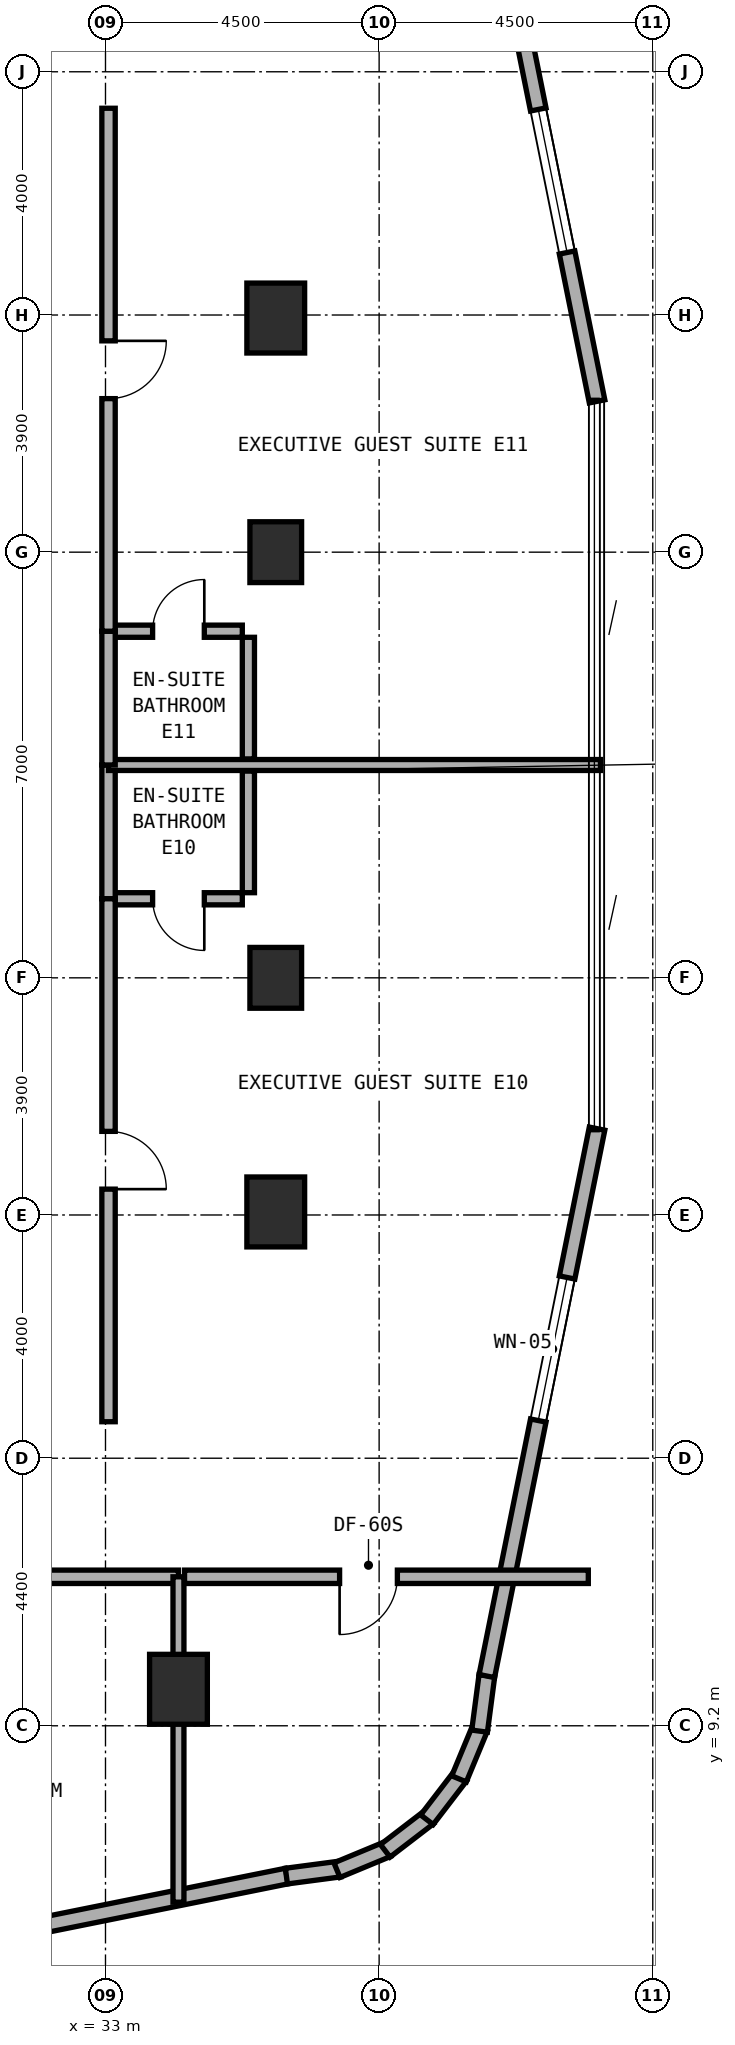
"""IFC4 building model, lengths in metres.
Left out: names, types, materials, properties, quantities, classifications, styles, units other than length and angle.
Written with IfcOpenShell. Run it as: python <this file> out.ifc"""

import sys

from ifc_helpers import new_model, si_unit, direction, frame, frame_2d, origin, origin_2d, place, context, subcontext, project, spatial, rectangle, extrude, element, fill, save


model = new_model("IFC4")
c1 = context("Model", 3, precision=1e-05, world=origin(), true_north=direction((0.0, 1.0)))
c2 = subcontext(c1, "Body", "Model", "MODEL_VIEW")
j1 = project(units=[si_unit("LENGTHUNIT", "METRE"), si_unit("PLANEANGLEUNIT", "RADIAN")], contexts=[c1])
p1 = place(None, origin())
s1 = spatial("IfcSite", under=j1, at=p1, CompositionType="ELEMENT")
p2 = place(p1, origin())
s2 = spatial("IfcBuilding", under=s1, at=p2, CompositionType="ELEMENT")
p3 = place(p2, frame((0.0, 0.0, 127.5)))
s3 = spatial("IfcBuildingStorey", under=s2, at=p3, CompositionType="ELEMENT", Elevation=127.5)
p4 = place(p3, frame((34.2, 9.8, 0.0), z_axis=(0.0, 0.0, 1.0), x_axis=(1.0, 0.0, 0.0)))
e1 = element("IfcColumn", 1, at=p4, inside=s3, PredefinedType="COLUMN", context=c2, shape_type="SweptSolid", body=[
    extrude(rectangle(XDim=0.95, YDim=1.15, at=origin_2d()), origin(), (0.0, 0.0, 1.0), 3.5),
])
for number, where, z_axis, x_axis in (
    (2, (35.8, 21.5, 0.0), (0.0, 0.0, 1.0), (1.0, 0.0, 0.0)),
    (3, (35.8, 28.5, 0.0), (0.0, 0.0, 1.0), (1.0, 0.0, 0.0)),
):
    element("IfcColumn", number, at=place(p3, frame(where, z_axis=z_axis, x_axis=x_axis)), inside=s3, PredefinedType="COLUMN", context=c2, shape_type="SweptSolid", body=[
        extrude(rectangle(XDim=0.85, YDim=1.0, at=origin_2d()), origin(), (0.0, 0.0, 1.0), 3.5),
    ])
for number, where, z_axis, x_axis in (
    (4, (35.8, 17.65, 0.0), (0.0, 0.0, 1.0), (1.0, 0.0, 0.0)),
    (5, (35.8, 32.35, 0.0), (0.0, 0.0, 1.0), (1.0, 0.0, 0.0)),
):
    element("IfcColumn", number, at=place(p3, frame(where, z_axis=z_axis, x_axis=x_axis)), inside=s3, PredefinedType="COLUMN", context=c2, shape_type="SweptSolid", body=[
        extrude(rectangle(XDim=0.95, YDim=1.15, at=origin_2d()), origin(), (0.0, 0.0, 1.0), 3.5),
    ])
p5 = place(p3, frame((26.98, 4.916, 0.0), z_axis=(0.0, 0.0, 1.0), x_axis=(0.980315963543, 0.197435082048, 0.0)))
e6 = element("IfcWall", 6, at=p5, inside=s3, PredefinedType="STANDARD", context=c2, shape_type="SweptSolid", body=[
    extrude(rectangle(XDim=9.183, YDim=0.26, at=frame_2d((4.591, 0.0))), origin(), (0.0, 0.0, 1.0), 3.22),
])
p6 = place(p5, frame((2.445, 0.0, 0.8)))
e7 = element("IfcOpeningElement", 7, at=p6, cuts=e6, PredefinedType="OPENING", context=c2, shape_type="SweptSolid", body=[
    extrude(rectangle(XDim=2.4, YDim=1.6, at=frame_2d((1.2, 0.8))), frame((0.0, 0.14, 0.0), z_axis=(0.0, -1.0, 0.0), x_axis=(1.0, 0.0, 0.0)), (0.0, 0.0, 1.0), 0.28),
])
p7 = place(p3, frame((35.975, 6.728, 0.0), z_axis=(0.0, 0.0, 1.0), x_axis=(0.991388484223, 0.130953706898, 0.0)))
e8 = element("IfcWall", 8, at=p7, inside=s3, PredefinedType="STANDARD", context=c2, shape_type="SweptSolid", body=[
    extrude(rectangle(XDim=0.885, YDim=0.26, at=frame_2d((0.443, 0.0))), origin(), (0.0, 0.0, 1.0), 3.22),
])
p8 = place(p3, frame((36.807, 6.826, 0.0), z_axis=(0.0, 0.0, 1.0), x_axis=(0.923627776508, 0.383290660547, 0.0)))
e9 = element("IfcWall", 9, at=p8, inside=s3, PredefinedType="STANDARD", context=c2, shape_type="SweptSolid", body=[
    extrude(rectangle(XDim=0.903, YDim=0.26, at=frame_2d((0.452, 0.0))), origin(), (0.0, 0.0, 1.0), 3.22),
])
p9 = place(p3, frame((37.601, 7.144, 0.0), z_axis=(0.0, 0.0, 1.0), x_axis=(0.793458244748, 0.608624690463, 0.0)))
e10 = element("IfcWall", 10, at=p9, inside=s3, PredefinedType="STANDARD", context=c2, shape_type="SweptSolid", body=[
    extrude(rectangle(XDim=0.902, YDim=0.26, at=frame_2d((0.451, 0.0))), origin(), (0.0, 0.0, 1.0), 3.22),
])
p10 = place(p3, frame((38.286, 7.655, 0.0), z_axis=(0.0, 0.0, 1.0), x_axis=(0.608494022858, 0.793558456666, 0.0)))
e11 = element("IfcWall", 11, at=p10, inside=s3, PredefinedType="STANDARD", context=c2, shape_type="SweptSolid", body=[
    extrude(rectangle(XDim=0.902, YDim=0.26, at=frame_2d((0.451, 0.0))), origin(), (0.0, 0.0, 1.0), 3.22),
])
p11 = place(p3, frame((38.814, 8.327, 0.0), z_axis=(0.0, 0.0, 1.0), x_axis=(0.383155708213, 0.923683767999, 0.0)))
e12 = element("IfcWall", 12, at=p11, inside=s3, PredefinedType="STANDARD", context=c2, shape_type="SweptSolid", body=[
    extrude(rectangle(XDim=0.903, YDim=0.26, at=frame_2d((0.451, 0.0))), origin(), (0.0, 0.0, 1.0), 3.22),
])
p12 = place(p3, frame((39.152, 9.112, 0.0), z_axis=(0.0, 0.0, 1.0), x_axis=(0.130200706103, 0.991487658083, 0.0)))
e13 = element("IfcWall", 13, at=p12, inside=s3, PredefinedType="STANDARD", context=c2, shape_type="SweptSolid", body=[
    extrude(rectangle(XDim=0.921, YDim=0.26, at=frame_2d((0.46, 0.0))), origin(), (0.0, 0.0, 1.0), 3.22),
])
p13 = place(p3, frame((39.271, 10.018, 0.0), z_axis=(0.0, 0.0, 1.0), x_axis=(0.197435082048, 0.980315963543, 0.0)))
e14 = element("IfcWall", 14, at=p13, inside=s3, PredefinedType="STANDARD", context=c2, shape_type="SweptSolid", body=[
    extrude(rectangle(XDim=9.183, YDim=0.26, at=frame_2d((4.591, 0.0))), origin(), (0.0, 0.0, 1.0), 3.22),
])
p14 = place(p13, frame((4.286, 0.0, 0.8)))
e15 = element("IfcOpeningElement", 15, at=p14, cuts=e14, PredefinedType="OPENING", context=c2, shape_type="SweptSolid", body=[
    extrude(rectangle(XDim=2.4, YDim=1.6, at=frame_2d((1.2, 0.8))), frame((0.0, 0.14, 0.0), z_axis=(0.0, -1.0, 0.0), x_axis=(1.0, 0.0, 0.0)), (0.0, 0.0, 1.0), 0.28),
])
p15 = place(p3, frame((41.084, 30.98, 0.0), z_axis=(0.0, 0.0, 1.0), x_axis=(-0.197435082048, 0.980315963543, 0.0)))
e16 = element("IfcWall", 16, at=p15, inside=s3, PredefinedType="STANDARD", context=c2, shape_type="SweptSolid", body=[
    extrude(rectangle(XDim=9.183, YDim=0.26, at=frame_2d((4.591, 0.0))), origin(), (0.0, 0.0, 1.0), 3.22),
])
p16 = place(p15, frame((2.497, 0.0, 0.8)))
e17 = element("IfcOpeningElement", 17, at=p16, cuts=e16, PredefinedType="OPENING", context=c2, shape_type="SweptSolid", body=[
    extrude(rectangle(XDim=2.4, YDim=1.6, at=frame_2d((1.2, 0.8))), frame((0.0, 0.14, 0.0), z_axis=(0.0, -1.0, 0.0), x_axis=(1.0, 0.0, 0.0)), (0.0, 0.0, 1.0), 0.28),
])
p17 = place(p3, frame((28.0, 11.65, 0.0), z_axis=(0.0, 0.0, 1.0), x_axis=(1.0, 0.0, 0.0)))
e18 = element("IfcWall", 18, at=p17, inside=s3, PredefinedType="SOLIDWALL", context=c2, shape_type="SweptSolid", body=[
    extrude(rectangle(XDim=6.2, YDim=0.22, at=frame_2d((3.1, 0.0))), origin(), (0.0, 0.0, 1.0), 2.695),
])
p18 = place(p17, frame((2.625, 0.0, 0.0)))
e19 = element("IfcOpeningElement", 19, at=p18, cuts=e18, PredefinedType="OPENING", context=c2, shape_type="SweptSolid", body=[
    extrude(rectangle(XDim=0.95, YDim=2.1, at=frame_2d((0.475, 1.05))), frame((0.0, 0.12, 0.0), z_axis=(0.0, -1.0, 0.0), x_axis=(1.0, 0.0, 0.0)), (0.0, 0.0, 1.0), 0.24),
])
p19 = place(p3, frame((34.2, 6.299, 0.0), z_axis=(0.0, 0.0, 1.0), x_axis=(0.0, 1.0, 0.0)))
e20 = element("IfcWall", 20, at=p19, inside=s3, PredefinedType="SOLIDWALL", context=c2, shape_type="SweptSolid", body=[
    extrude(rectangle(XDim=5.351, YDim=0.18, at=frame_2d((2.675, 0.0))), origin(), (0.0, 0.0, 1.0), 2.695),
])
p20 = place(p3, frame((34.3, 11.65, 0.0), z_axis=(0.0, 0.0, 1.0), x_axis=(1.0, 0.0, 0.0)))
e21 = element("IfcWall", 21, at=p20, inside=s3, PredefinedType="SOLIDWALL", context=c2, shape_type="SweptSolid", body=[
    extrude(rectangle(XDim=6.64, YDim=0.22, at=frame_2d((3.32, 0.0))), origin(), (0.0, 0.0, 1.0), 2.835),
])
p21 = place(p20, frame((2.55, 0.0, 0.0)))
e22 = element("IfcOpeningElement", 22, at=p21, cuts=e21, PredefinedType="OPENING", context=c2, shape_type="SweptSolid", body=[
    extrude(rectangle(XDim=0.95, YDim=2.1, at=frame_2d((0.475, 1.05))), frame((0.0, 0.12, 0.0), z_axis=(0.0, -1.0, 0.0), x_axis=(1.0, 0.0, 0.0)), (0.0, 0.0, 1.0), 0.24),
])
p22 = place(p3, frame((33.15, 22.8, 0.0), z_axis=(0.0, 0.0, 1.0), x_axis=(1.0, 0.0, 0.0)))
e23 = element("IfcWall", 23, at=p22, inside=s3, PredefinedType="PLUMBINGWALL", context=c2, shape_type="SweptSolid", body=[
    extrude(rectangle(XDim=2.1, YDim=0.2, at=frame_2d((1.05, 0.0))), origin(), (0.0, 0.0, 1.0), 3.22),
])
p23 = place(p22, frame((0.625, 0.0, 0.0)))
e24 = element("IfcOpeningElement", 24, at=p23, cuts=e23, PredefinedType="OPENING", context=c2, shape_type="SweptSolid", body=[
    extrude(rectangle(XDim=0.85, YDim=2.1, at=frame_2d((0.425, 1.05))), frame((0.0, 0.11, 0.0), z_axis=(0.0, -1.0, 0.0), x_axis=(1.0, 0.0, 0.0)), (0.0, 0.0, 1.0), 0.22),
])
p24 = place(p3, frame((35.35, 22.9, 0.0), z_axis=(0.0, 0.0, 1.0), x_axis=(0.0, 1.0, 0.0)))
e25 = element("IfcWall", 25, at=p24, inside=s3, PredefinedType="PLUMBINGWALL", context=c2, shape_type="SweptSolid", body=[
    extrude(rectangle(XDim=2.0, YDim=0.2, at=frame_2d((1.0, 0.0))), origin(), (0.0, 0.0, 1.0), 3.22),
])
p25 = place(p3, frame((33.05, 22.8, 0.0), z_axis=(0.0, 0.0, 1.0), x_axis=(0.0, 1.0, 0.0)))
e26 = element("IfcWall", 26, at=p25, inside=s3, PredefinedType="SOLIDWALL", context=c2, shape_type="SweptSolid", body=[
    extrude(rectangle(XDim=2.2, YDim=0.22, at=frame_2d((1.1, 0.0))), origin(), (0.0, 0.0, 1.0), 3.22),
])
p26 = place(p3, frame((33.05, 14.2, 0.0), z_axis=(0.0, 0.0, 1.0), x_axis=(0.0, 1.0, 0.0)))
e27 = element("IfcWall", 27, at=p26, inside=s3, PredefinedType="SOLIDWALL", context=c2, shape_type="SweptSolid", body=[
    extrude(rectangle(XDim=8.6, YDim=0.22, at=frame_2d((4.3, 0.0))), origin(), (0.0, 0.0, 1.0), 2.695),
])
p27 = place(p26, frame((3.825, 0.0, 0.0)))
e28 = element("IfcOpeningElement", 28, at=p27, cuts=e27, PredefinedType="OPENING", context=c2, shape_type="SweptSolid", body=[
    extrude(rectangle(XDim=0.95, YDim=2.1, at=frame_2d((0.475, 1.05))), frame((0.0, 0.12, 0.0), z_axis=(0.0, -1.0, 0.0), x_axis=(1.0, 0.0, 0.0)), (0.0, 0.0, 1.0), 0.24),
])
p28 = place(p3, frame((33.05, 25.0, 0.0), z_axis=(0.0, 0.0, 1.0), x_axis=(1.0, 0.0, 0.0)))
e29 = element("IfcWall", 29, at=p28, inside=s3, PredefinedType="SOLIDWALL", context=c2, shape_type="SweptSolid", body=[
    extrude(rectangle(XDim=8.09, YDim=0.18, at=frame_2d((4.045, 0.0))), origin(), (0.0, 0.0, 1.0), 2.835),
])
p29 = place(p3, frame((33.15, 27.2, 0.0), z_axis=(0.0, 0.0, 1.0), x_axis=(1.0, 0.0, 0.0)))
e30 = element("IfcWall", 30, at=p29, inside=s3, PredefinedType="PLUMBINGWALL", context=c2, shape_type="SweptSolid", body=[
    extrude(rectangle(XDim=2.1, YDim=0.2, at=frame_2d((1.05, 0.0))), origin(), (0.0, 0.0, 1.0), 3.22),
])
p30 = place(p29, frame((0.625, 0.0, 0.0)))
e31 = element("IfcOpeningElement", 31, at=p30, cuts=e30, PredefinedType="OPENING", context=c2, shape_type="SweptSolid", body=[
    extrude(rectangle(XDim=0.85, YDim=2.1, at=frame_2d((0.425, 1.05))), frame((0.0, 0.11, 0.0), z_axis=(0.0, -1.0, 0.0), x_axis=(1.0, 0.0, 0.0)), (0.0, 0.0, 1.0), 0.22),
])
p31 = place(p3, frame((35.35, 25.1, 0.0), z_axis=(0.0, 0.0, 1.0), x_axis=(0.0, 1.0, 0.0)))
e32 = element("IfcWall", 32, at=p31, inside=s3, PredefinedType="PLUMBINGWALL", context=c2, shape_type="SweptSolid", body=[
    extrude(rectangle(XDim=2.0, YDim=0.2, at=frame_2d((1.0, 0.0))), origin(), (0.0, 0.0, 1.0), 3.22),
])
p32 = place(p3, frame((33.05, 25.0, 0.0), z_axis=(0.0, 0.0, 1.0), x_axis=(0.0, 1.0, 0.0)))
e33 = element("IfcWall", 33, at=p32, inside=s3, PredefinedType="SOLIDWALL", context=c2, shape_type="SweptSolid", body=[
    extrude(rectangle(XDim=2.2, YDim=0.22, at=frame_2d((1.1, 0.0))), origin(), (0.0, 0.0, 1.0), 3.22),
])
p33 = place(p3, frame((33.05, 27.2, 0.0), z_axis=(0.0, 0.0, 1.0), x_axis=(0.0, 1.0, 0.0)))
e34 = element("IfcWall", 34, at=p33, inside=s3, PredefinedType="SOLIDWALL", context=c2, shape_type="SweptSolid", body=[
    extrude(rectangle(XDim=8.6, YDim=0.22, at=frame_2d((4.3, 0.0))), origin(), (0.0, 0.0, 1.0), 2.695),
])
p34 = place(p33, frame((3.825, 0.0, 0.0)))
e35 = element("IfcOpeningElement", 35, at=p34, cuts=e34, PredefinedType="OPENING", context=c2, shape_type="SweptSolid", body=[
    extrude(rectangle(XDim=0.95, YDim=2.1, at=frame_2d((0.475, 1.05))), frame((0.0, 0.12, 0.0), z_axis=(0.0, -1.0, 0.0), x_axis=(1.0, 0.0, 0.0)), (0.0, 0.0, 1.0), 0.24),
])
p35 = place(p14, origin())
e36 = element("IfcWindow", 36, at=p35, inside=s3, PartitioningType="SINGLE_PANEL", PredefinedType="WINDOW", context=c2, shape_type="SweptSolid", body=[
    extrude(rectangle(XDim=2.4, YDim=1.6, at=frame_2d((1.2, 0.8))), frame((0.0, 0.03, 0.0), z_axis=(0.0, -1.0, 0.0), x_axis=(1.0, 0.0, 0.0)), (0.0, 0.0, 1.0), 0.06),
])
fill(e15, e36)
p36 = place(p16, origin())
e37 = element("IfcWindow", 37, at=p36, inside=s3, PartitioningType="SINGLE_PANEL", PredefinedType="WINDOW", context=c2, shape_type="SweptSolid", body=[
    extrude(rectangle(XDim=2.4, YDim=1.6, at=frame_2d((1.2, 0.8))), frame((0.0, 0.03, 0.0), z_axis=(0.0, -1.0, 0.0), x_axis=(1.0, 0.0, 0.0)), (0.0, 0.0, 1.0), 0.06),
])
fill(e17, e37)
p37 = place(p21, frame((0.95, 0.0, 0.0), z_axis=(0.0, 0.0, 1.0), x_axis=(-1.0, 0.0, 0.0)))
e38 = element("IfcDoor", 38, at=p37, inside=s3, OperationType="SINGLE_SWING_RIGHT", PredefinedType="DOOR", context=c2, shape_type="SweptSolid", body=[
    extrude(rectangle(XDim=0.95, YDim=2.1, at=frame_2d((0.475, 1.05))), frame((0.0, 0.025, 0.0), z_axis=(0.0, -1.0, 0.0), x_axis=(1.0, 0.0, 0.0)), (0.0, 0.0, 1.0), 0.05),
])
fill(e22, e38)
p38 = place(p23, frame((0.85, 0.0, 0.0), z_axis=(0.0, 0.0, 1.0), x_axis=(-1.0, 0.0, 0.0)))
e39 = element("IfcDoor", 39, at=p38, inside=s3, OperationType="SINGLE_SWING_LEFT", PredefinedType="DOOR", context=c2, shape_type="SweptSolid", body=[
    extrude(rectangle(XDim=0.85, YDim=2.1, at=frame_2d((0.425, 1.05))), frame((0.0, 0.025, 0.0), z_axis=(0.0, -1.0, 0.0), x_axis=(1.0, 0.0, 0.0)), (0.0, 0.0, 1.0), 0.05),
])
fill(e24, e39)
p39 = place(p27, frame((0.95, 0.0, 0.0), z_axis=(0.0, 0.0, 1.0), x_axis=(-1.0, 0.0, 0.0)))
e40 = element("IfcDoor", 40, at=p39, inside=s3, OperationType="SINGLE_SWING_RIGHT", PredefinedType="DOOR", context=c2, shape_type="SweptSolid", body=[
    extrude(rectangle(XDim=0.95, YDim=2.1, at=frame_2d((0.475, 1.05))), frame((0.0, 0.025, 0.0), z_axis=(0.0, -1.0, 0.0), x_axis=(1.0, 0.0, 0.0)), (0.0, 0.0, 1.0), 0.05),
])
fill(e28, e40)
p40 = place(p30, origin())
e41 = element("IfcDoor", 41, at=p40, inside=s3, OperationType="SINGLE_SWING_RIGHT", PredefinedType="DOOR", context=c2, shape_type="SweptSolid", body=[
    extrude(rectangle(XDim=0.85, YDim=2.1, at=frame_2d((0.425, 1.05))), frame((0.0, 0.025, 0.0), z_axis=(0.0, -1.0, 0.0), x_axis=(1.0, 0.0, 0.0)), (0.0, 0.0, 1.0), 0.05),
])
fill(e31, e41)
p41 = place(p34, frame((0.95, 0.0, 0.0), z_axis=(0.0, 0.0, 1.0), x_axis=(-1.0, 0.0, 0.0)))
e42 = element("IfcDoor", 42, at=p41, inside=s3, OperationType="SINGLE_SWING_LEFT", PredefinedType="DOOR", context=c2, shape_type="SweptSolid", body=[
    extrude(rectangle(XDim=0.95, YDim=2.1, at=frame_2d((0.475, 1.05))), frame((0.0, 0.025, 0.0), z_axis=(0.0, -1.0, 0.0), x_axis=(1.0, 0.0, 0.0)), (0.0, 0.0, 1.0), 0.05),
])
fill(e35, e42)
save(model, sys.argv[1])
